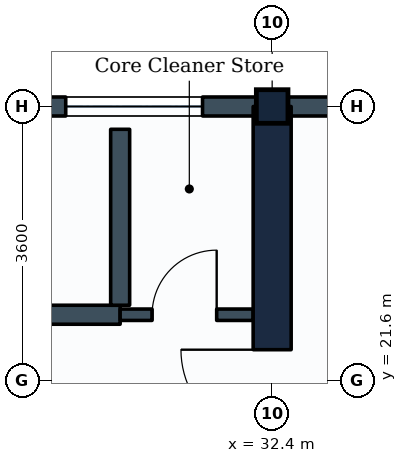
"""IFC4 building model, lengths in metres.
Left out: names, types, materials, properties, quantities, classifications, styles, units other than length and angle.
Written with IfcOpenShell. Run it as: python <this file> out.ifc"""

import sys

from ifc_helpers import new_model, si_unit, direction, frame, frame_2d, origin, origin_2d, place, context, subcontext, project, spatial, rectangle, i_section, extrude, element, fill, save


model = new_model("IFC4")
c1 = context("Model", 3, precision=1e-05, world=origin(), true_north=direction((0.0, 1.0)))
c2 = subcontext(c1, "Body", "Model", "MODEL_VIEW")
j1 = project(units=[si_unit("LENGTHUNIT", "METRE"), si_unit("PLANEANGLEUNIT", "RADIAN")], contexts=[c1])
p1 = place(None, origin())
s1 = spatial("IfcSite", under=j1, at=p1, CompositionType="ELEMENT")
p2 = place(p1, origin())
s2 = spatial("IfcBuilding", under=s1, at=p2, CompositionType="ELEMENT")
p3 = place(p2, frame((0.0, 0.0, 182.4)))
s3 = spatial("IfcBuildingStorey", under=s2, at=p3, CompositionType="ELEMENT", Elevation=182.4)
p4 = place(p3, frame((32.4, 25.2, 0.0), z_axis=(0.0, 0.0, 1.0), x_axis=(1.0, 0.0, 0.0)))
e1 = element("IfcColumn", 1, at=p4, inside=s3, PredefinedType="COLUMN", context=c2, shape_type="SweptSolid", body=[
    extrude(i_section(OverallWidth=0.416, OverallDepth=0.442, WebThickness=0.025, FlangeThickness=0.041, FilletRadius=0.015, at=origin_2d()), origin(), (0.0, 0.0, 1.0), 3.8),
])
p5 = place(p3, frame((32.4, 25.2, 0.0), z_axis=(0.0, 0.0, 1.0), x_axis=(1.0, 0.0, 0.0)))
e2 = element("IfcWall", 2, at=p5, inside=s3, PredefinedType="STANDARD", context=c2, shape_type="SweptSolid", body=[
    extrude(rectangle(XDim=3.6, YDim=0.25, at=frame_2d((1.8, 0.0))), origin(), (0.0, 0.0, 1.0), 2.93),
])
p6 = place(p3, frame((28.8, 25.2, 0.0), z_axis=(0.0, 0.0, 1.0), x_axis=(1.0, 0.0, 0.0)))
e3 = element("IfcWall", 3, at=p6, inside=s3, PredefinedType="STANDARD", context=c2, shape_type="SweptSolid", body=[
    extrude(rectangle(XDim=3.6, YDim=0.25, at=frame_2d((1.8, 0.0))), origin(), (0.0, 0.0, 1.0), 2.93),
])
p7 = place(p6, frame((0.884, 0.0, 0.85)))
e4 = element("IfcOpeningElement", 4, at=p7, cuts=e3, PredefinedType="OPENING", context=c2, shape_type="SweptSolid", body=[
    extrude(rectangle(XDim=1.8, YDim=1.35, at=frame_2d((0.9, 0.675))), frame((0.0, 0.135, 0.0), z_axis=(0.0, -1.0, 0.0), x_axis=(1.0, 0.0, 0.0)), (0.0, 0.0, 1.0), 0.27),
])
p8 = place(p3, frame((32.4, 10.8, 0.0), z_axis=(0.0, 0.0, 1.0), x_axis=(0.0, 1.0, 0.0)))
e5 = element("IfcWall", 5, at=p8, inside=s3, PredefinedType="SHEAR", context=c2, shape_type="SweptSolid", body=[
    extrude(rectangle(XDim=14.4, YDim=0.5, at=frame_2d((7.2, 0.0))), origin(), (0.0, 0.0, 1.0), 3.55),
])
p9 = place(p8, frame((4.35, 0.0, 0.0)))
e6 = element("IfcOpeningElement", 6, at=p9, cuts=e5, PredefinedType="OPENING", context=c2, shape_type="SweptSolid", body=[
    extrude(rectangle(XDim=1.2, YDim=2.1, at=frame_2d((0.6, 1.05))), frame((0.0, 0.26, 0.0), z_axis=(0.0, -1.0, 0.0), x_axis=(1.0, 0.0, 0.0)), (0.0, 0.0, 1.0), 0.52),
])
p10 = place(p8, frame((10.0, 0.0, 0.0)))
e7 = element("IfcOpeningElement", 7, at=p10, cuts=e5, PredefinedType="OPENING", context=c2, shape_type="SweptSolid", body=[
    extrude(rectangle(XDim=1.2, YDim=2.1, at=frame_2d((0.6, 1.05))), frame((0.0, 0.26, 0.0), z_axis=(0.0, -1.0, 0.0), x_axis=(1.0, 0.0, 0.0)), (0.0, 0.0, 1.0), 0.52),
])
p11 = place(p3, frame((23.18, 22.46, 0.0), z_axis=(0.0, 0.0, 1.0), x_axis=(1.0, 0.0, 0.0)))
e8 = element("IfcWall", 8, at=p11, inside=s3, PredefinedType="PARTITIONING", context=c2, shape_type="SweptSolid", body=[
    extrude(rectangle(XDim=7.22, YDim=0.25, at=frame_2d((3.61, 0.0))), origin(), (0.0, 0.0, 1.0), 3.535),
])
p12 = place(p3, frame((30.4, 22.585, 0.0), z_axis=(0.0, 0.0, 1.0), x_axis=(0.0, 1.0, 0.0)))
e9 = element("IfcWall", 9, at=p12, inside=s3, PredefinedType="PARTITIONING", context=c2, shape_type="SweptSolid", body=[
    extrude(rectangle(XDim=2.315, YDim=0.25, at=frame_2d((1.157, 0.0))), origin(), (0.0, 0.0, 1.0), 3.535),
])
p13 = place(p3, frame((30.4, 22.46, 0.0), z_axis=(0.0, 0.0, 1.0), x_axis=(1.0, 0.0, 0.0)))
e10 = element("IfcWall", 10, at=p13, inside=s3, PredefinedType="PARTITIONING", context=c2, shape_type="SweptSolid", body=[
    extrude(rectangle(XDim=1.75, YDim=0.15, at=frame_2d((0.875, 0.0))), origin(), (0.0, 0.0, 1.0), 3.535),
])
p14 = place(p13, frame((0.42, 0.0, 0.0)))
e11 = element("IfcOpeningElement", 11, at=p14, cuts=e10, PredefinedType="OPENING", context=c2, shape_type="SweptSolid", body=[
    extrude(rectangle(XDim=0.85, YDim=2.1, at=frame_2d((0.425, 1.05))), frame((0.0, 0.085, 0.0), z_axis=(0.0, -1.0, 0.0), x_axis=(1.0, 0.0, 0.0)), (0.0, 0.0, 1.0), 0.17),
])
p15 = place(p7, origin())
e12 = element("IfcWindow", 12, at=p15, inside=s3, PartitioningType="SINGLE_PANEL", PredefinedType="WINDOW", context=c2, shape_type="SweptSolid", body=[
    extrude(rectangle(XDim=1.8, YDim=1.35, at=frame_2d((0.9, 0.675))), frame((0.0, 0.03, 0.0), z_axis=(0.0, -1.0, 0.0), x_axis=(1.0, 0.0, 0.0)), (0.0, 0.0, 1.0), 0.06),
])
fill(e4, e12)
p16 = place(p10, origin())
e13 = element("IfcDoor", 13, at=p16, inside=s3, OperationType="SINGLE_SWING_RIGHT", PredefinedType="DOOR", context=c2, shape_type="SweptSolid", body=[
    extrude(rectangle(XDim=1.2, YDim=2.1, at=frame_2d((0.6, 1.05))), frame((0.0, 0.025, 0.0), z_axis=(0.0, -1.0, 0.0), x_axis=(1.0, 0.0, 0.0)), (0.0, 0.0, 1.0), 0.05),
])
fill(e7, e13)
p17 = place(p14, origin())
e14 = element("IfcDoor", 14, at=p17, inside=s3, OperationType="SINGLE_SWING_RIGHT", PredefinedType="DOOR", context=c2, shape_type="SweptSolid", body=[
    extrude(rectangle(XDim=0.85, YDim=2.1, at=frame_2d((0.425, 1.05))), frame((0.0, 0.025, 0.0), z_axis=(0.0, -1.0, 0.0), x_axis=(1.0, 0.0, 0.0)), (0.0, 0.0, 1.0), 0.05),
])
fill(e11, e14)
save(model, sys.argv[1])
